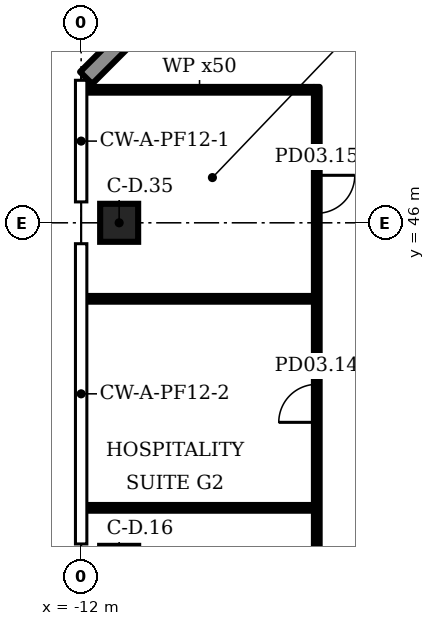
"""IFC4 building model, lengths in metres.
Left out: names, types, materials, properties, quantities, classifications, styles, units other than length and angle.
Written with IfcOpenShell. Run it as: python <this file> out.ifc"""

import sys

from ifc_helpers import new_model, si_unit, direction, frame, frame_2d, origin, origin_2d, place, context, subcontext, project, spatial, rectangle, extrude, element, fill, save


model = new_model("IFC4")
c1 = context("Model", 3, precision=1e-05, world=origin(), true_north=direction((0.0, 1.0)))
c2 = subcontext(c1, "Body", "Model", "MODEL_VIEW")
j1 = project(units=[si_unit("LENGTHUNIT", "METRE"), si_unit("PLANEANGLEUNIT", "RADIAN")], contexts=[c1])
p1 = place(None, origin())
s1 = spatial("IfcSite", under=j1, at=p1, CompositionType="ELEMENT")
p2 = place(p1, origin())
s2 = spatial("IfcBuilding", under=s1, at=p2, CompositionType="ELEMENT")
p3 = place(p2, frame((0.0, 0.0, 21.5)))
s3 = spatial("IfcBuildingStorey", under=s2, at=p3, CompositionType="ELEMENT", Elevation=21.5)
p4 = place(p3, frame((-11.0, 46.0, 0.0), z_axis=(0.0, 0.0, 1.0), x_axis=(1.0, 0.0, 0.0)))
e1 = element("IfcColumn", 1, at=p4, inside=s3, PredefinedType="COLUMN", context=c2, shape_type="SweptSolid", body=[
    extrude(rectangle(XDim=1.0, YDim=1.0, at=origin_2d()), origin(), (0.0, 0.0, 1.0), 6.0),
])
p5 = place(p3, frame((-5.912, 55.77, 0.0), z_axis=(0.0, 0.0, 1.0), x_axis=(-0.707092, -0.707121, 0.0)))
e2 = element("IfcWall", 2, at=p5, inside=s3, PredefinedType="SOLIDWALL", context=c2, shape_type="SweptSolid", body=[
    extrude(rectangle(XDim=8.425, YDim=0.45, at=frame_2d((4.213, 0.0))), origin(), (0.0, 0.0, 1.0), 5.7),
])
p6 = place(p3, frame((-5.8, 32.925, 0.0), z_axis=(0.0, 0.0, 1.0), x_axis=(0.0, 1.0, 0.0)))
e3 = element("IfcWall", 3, at=p6, inside=s3, PredefinedType="PARTITIONING", context=c2, shape_type="SweptSolid", body=[
    extrude(rectangle(XDim=16.65, YDim=0.15, at=frame_2d((8.325, 0.0))), origin(), (0.0, 0.0, 1.0), 5.7),
])
p7 = place(p6, frame((2.325, 0.0, 0.0)))
e4 = element("IfcOpeningElement", 4, at=p7, cuts=e3, PredefinedType="OPENING", context=c2, shape_type="SweptSolid", body=[
    extrude(rectangle(XDim=1.0, YDim=2.1, at=frame_2d((0.5, 1.05))), frame((0.0, 0.085, 0.0), z_axis=(0.0, -1.0, 0.0), x_axis=(1.0, 0.0, 0.0)), (0.0, 0.0, 1.0), 0.17),
])
p8 = place(p6, frame((7.825, 0.0, 0.0)))
e5 = element("IfcOpeningElement", 5, at=p8, cuts=e3, PredefinedType="OPENING", context=c2, shape_type="SweptSolid", body=[
    extrude(rectangle(XDim=1.0, YDim=2.1, at=frame_2d((0.5, 1.05))), frame((0.0, 0.085, 0.0), z_axis=(0.0, -1.0, 0.0), x_axis=(1.0, 0.0, 0.0)), (0.0, 0.0, 1.0), 0.17),
])
p9 = place(p6, frame((13.325, 0.0, 0.0)))
e6 = element("IfcOpeningElement", 6, at=p9, cuts=e3, PredefinedType="OPENING", context=c2, shape_type="SweptSolid", body=[
    extrude(rectangle(XDim=1.0, YDim=2.1, at=frame_2d((0.5, 1.05))), frame((0.0, 0.085, 0.0), z_axis=(0.0, -1.0, 0.0), x_axis=(1.0, 0.0, 0.0)), (0.0, 0.0, 1.0), 0.17),
])
for number, where, z_axis, x_axis in (
    (7, (-11.895, 38.5, 0.0), (0.0, 0.0, 1.0), (1.0, 0.0, 0.0)),
    (8, (-11.895, 44.0, 0.0), (0.0, 0.0, 1.0), (1.0, 0.0, 0.0)),
    (9, (-11.895, 49.5, 0.0), (0.0, 0.0, 1.0), (1.0, 0.0, 0.0)),
):
    element("IfcWall", number, at=place(p3, frame(where, z_axis=z_axis, x_axis=x_axis)), inside=s3, PredefinedType="PARTITIONING", context=c2, shape_type="SweptSolid", body=[
        extrude(rectangle(XDim=6.02, YDim=0.15, at=frame_2d((3.01, 0.0))), origin(), (0.0, 0.0, 1.0), 5.7),
    ])
p10 = place(p8, origin())
e10 = element("IfcDoor", 10, at=p10, inside=s3, OperationType="SINGLE_SWING_LEFT", PredefinedType="DOOR", context=c2, shape_type="SweptSolid", body=[
    extrude(rectangle(XDim=1.0, YDim=2.1, at=frame_2d((0.5, 1.05))), frame((0.0, 0.025, 0.0), z_axis=(0.0, -1.0, 0.0), x_axis=(1.0, 0.0, 0.0)), (0.0, 0.0, 1.0), 0.05),
])
fill(e5, e10)
p11 = place(p9, origin())
e11 = element("IfcDoor", 11, at=p11, inside=s3, OperationType="SINGLE_SWING_RIGHT", PredefinedType="DOOR", context=c2, shape_type="SweptSolid", body=[
    extrude(rectangle(XDim=1.0, YDim=2.1, at=frame_2d((0.5, 1.05))), frame((0.0, 0.025, 0.0), z_axis=(0.0, -1.0, 0.0), x_axis=(1.0, 0.0, 0.0)), (0.0, 0.0, 1.0), 0.05),
])
fill(e6, e11)
save(model, sys.argv[1])
